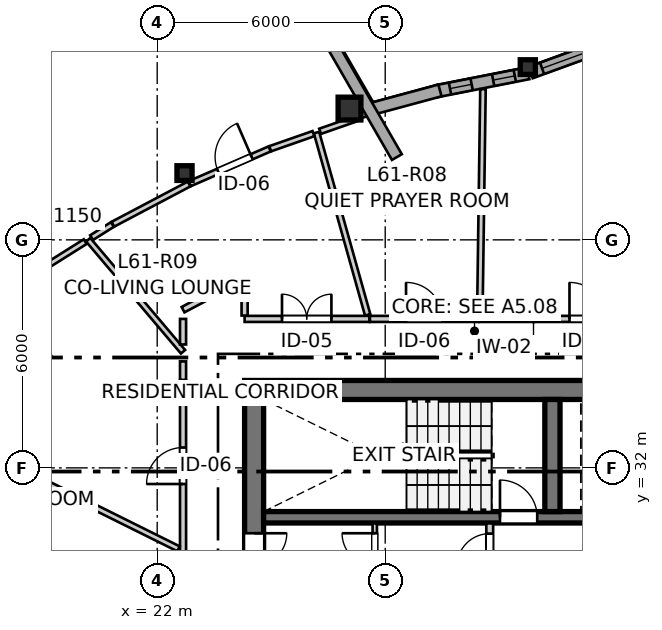
"""IFC4 building model, lengths in metres.
Left out: names, types, materials, properties, quantities, classifications, styles, units other than length and angle.
Written with IfcOpenShell. Run it as: python <this file> out.ifc"""

import sys

from ifc_helpers import new_model, si_unit, direction, frame, frame_2d, origin, origin_2d, place, context, subcontext, project, spatial, rectangle, i_section, extrude, source, transform, mapped, element, fill, save


model = new_model("IFC4")
c1 = context("Model", 3, precision=1e-05, world=origin(), true_north=direction((0.0, 1.0)))
c2 = subcontext(c1, "Body", "Model", "MODEL_VIEW")
j1 = project(units=[si_unit("LENGTHUNIT", "METRE"), si_unit("PLANEANGLEUNIT", "RADIAN")], contexts=[c1])
p1 = place(None, origin())
s1 = spatial("IfcSite", under=j1, at=p1, CompositionType="ELEMENT")
p2 = place(p1, origin())
s2 = spatial("IfcBuilding", under=s1, at=p2, CompositionType="ELEMENT")
p3 = place(p2, frame((0.0, 0.0, 205.2)))
s3 = spatial("IfcBuildingStorey", under=s2, at=p3, CompositionType="ELEMENT", Elevation=205.2)
p4 = place(p3, frame((36.4, 34.05, 0.0), z_axis=(0.0, 0.0, 1.0), x_axis=(-1.0, 0.0, 0.0)))
e1 = element("IfcWall", 1, at=p4, inside=s3, PredefinedType="SHEAR", context=c2, shape_type="SweptSolid", body=[
    extrude(rectangle(XDim=12.1, YDim=0.5, at=frame_2d((6.05, 0.0))), origin(), (0.0, 0.0, 1.0), 2.935),
])
p5 = place(p3, frame((24.55, 33.8, 0.0), z_axis=(0.0, 0.0, 1.0), x_axis=(0.0, -1.0, 0.0)))
e2 = element("IfcWall", 2, at=p5, inside=s3, PredefinedType="SHEAR", context=c2, shape_type="SweptSolid", body=[
    extrude(rectangle(XDim=15.6, YDim=0.5, at=frame_2d((7.8, 0.0))), origin(), (0.0, 0.0, 1.0), 2.935),
])
p6 = place(p5, frame((7.05, 0.0, 0.0)))
e3 = element("IfcOpeningElement", 3, at=p6, cuts=e2, PredefinedType="OPENING", context=c2, shape_type="SweptSolid", body=[
    extrude(rectangle(XDim=1.5, YDim=2.15, at=frame_2d((0.75, 1.075))), frame((0.0, 0.26, 0.0), z_axis=(0.0, -1.0, 0.0), x_axis=(1.0, 0.0, 0.0)), (0.0, 0.0, 1.0), 0.52),
])
p7 = place(p5, frame((3.52, 0.0, 0.0)))
e4 = element("IfcOpeningElement", 4, at=p7, cuts=e2, PredefinedType="OPENING", context=c2, shape_type="SweptSolid", body=[
    extrude(rectangle(XDim=0.86, YDim=2.05, at=frame_2d((0.43, 1.025))), frame((0.0, 0.26, 0.0), z_axis=(0.0, -1.0, 0.0), x_axis=(1.0, 0.0, 0.0)), (0.0, 0.0, 1.0), 0.52),
])
p8 = place(p5, frame((11.22, 0.0, 0.0)))
e5 = element("IfcOpeningElement", 5, at=p8, cuts=e2, PredefinedType="OPENING", context=c2, shape_type="SweptSolid", body=[
    extrude(rectangle(XDim=0.86, YDim=2.05, at=frame_2d((0.43, 1.025))), frame((0.0, 0.26, 0.0), z_axis=(0.0, -1.0, 0.0), x_axis=(1.0, 0.0, 0.0)), (0.0, 0.0, 1.0), 0.52),
])
p9 = place(p3, frame((24.8, 30.7, 0.0), z_axis=(0.0, 0.0, 1.0), x_axis=(1.0, 0.0, 0.0)))
e6 = element("IfcWall", 6, at=p9, inside=s3, PredefinedType="SHEAR", context=c2, shape_type="SweptSolid", body=[
    extrude(rectangle(XDim=11.1, YDim=0.3, at=frame_2d((5.55, 0.0))), origin(), (0.0, 0.0, 1.0), 2.935),
])
p10 = place(p9, frame((6.22, 0.0, 0.0)))
e7 = element("IfcOpeningElement", 7, at=p10, cuts=e6, PredefinedType="OPENING", context=c2, shape_type="SweptSolid", body=[
    extrude(rectangle(XDim=0.98, YDim=2.15, at=frame_2d((0.49, 1.075))), frame((0.0, 0.16, 0.0), z_axis=(0.0, -1.0, 0.0), x_axis=(1.0, 0.0, 0.0)), (0.0, 0.0, 1.0), 0.32),
])
p11 = place(p9, frame((9.15, 0.0, 0.0)))
e8 = element("IfcOpeningElement", 8, at=p11, cuts=e6, PredefinedType="OPENING", context=c2, shape_type="SweptSolid", body=[
    extrude(rectangle(XDim=1.15, YDim=2.15, at=frame_2d((0.575, 1.075))), frame((0.0, 0.16, 0.0), z_axis=(0.0, -1.0, 0.0), x_axis=(1.0, 0.0, 0.0)), (0.0, 0.0, 1.0), 0.32),
])
p12 = place(p3, frame((32.4, 30.85, 0.0), z_axis=(0.0, 0.0, 1.0), x_axis=(0.0, 1.0, 0.0)))
e9 = element("IfcWall", 9, at=p12, inside=s3, PredefinedType="SHEAR", context=c2, shape_type="SweptSolid", body=[
    extrude(rectangle(XDim=2.95, YDim=0.4, at=frame_2d((1.475, 0.0))), origin(), (0.0, 0.0, 1.0), 2.935),
])
m1 = source(origin(), c2, "Body", "SweptSolid", [
    extrude(i_section(OverallWidth=0.398, OverallDepth=0.387, WebThickness=0.019, FlangeThickness=0.03, FilletRadius=0.015, at=origin_2d()), origin(), (0.0, 0.0, 1.0), 2.935),
])
p13 = place(p3, frame((31.752, 42.545, 0.0), z_axis=(0.0, 0.0, 1.0), x_axis=(1.0, 0.0, 0.0)))
e10 = element("IfcColumn", 10, at=p13, inside=s3, PredefinedType="PILASTER", context=c2, shape_type="MappedRepresentation", body=[
    mapped(m1, transform((0.0, 0.0, 0.0), x_axis=(1.0, 0.0, 0.0), y_axis=(0.0, 1.0, 0.0), z_axis=(0.0, 0.0, 1.0), scale=1.0)),
])
m2 = source(origin(), c2, "Body", "SweptSolid", [
    extrude(rectangle(XDim=0.6, YDim=0.6, at=origin_2d()), origin(), (0.0, 0.0, 1.0), 2.935),
])
p14 = place(p3, frame((27.06, 41.454, 0.0), z_axis=(0.0, 0.0, 1.0), x_axis=(1.0, 0.0, 0.0)))
e11 = element("IfcColumn", 11, at=p14, inside=s3, PredefinedType="COLUMN", context=c2, shape_type="MappedRepresentation", body=[
    mapped(m2, transform((0.0, 0.0, 0.0), x_axis=(1.0, 0.0, 0.0), y_axis=(0.0, 1.0, 0.0), z_axis=(0.0, 0.0, 1.0), scale=1.0)),
])
p15 = place(p3, frame((22.719, 39.757, 0.0), z_axis=(0.0, 0.0, 1.0), x_axis=(1.0, 0.0, 0.0)))
e12 = element("IfcColumn", 12, at=p15, inside=s3, PredefinedType="PILASTER", context=c2, shape_type="MappedRepresentation", body=[
    mapped(m1, transform((0.0, 0.0, 0.0), x_axis=(1.0, 0.0, 0.0), y_axis=(0.0, 1.0, 0.0), z_axis=(0.0, 0.0, 1.0), scale=1.0)),
])
p16 = place(p3, frame((33.736, 43.097, 0.0), z_axis=(0.0, 0.0, 1.0), x_axis=(-0.939691662178, -0.342022777067, 0.0)))
e13 = element("IfcWall", 13, at=p16, inside=s3, PredefinedType="SOLIDWALL", context=c2, shape_type="SweptSolid", body=[
    extrude(rectangle(XDim=2.032, YDim=0.32, at=frame_2d((1.016, 0.0))), origin(), (0.0, 0.0, 1.0), 2.555),
])
p17 = place(p16, frame((0.261, 0.0, 0.82)))
e14 = element("IfcOpeningElement", 14, at=p17, cuts=e13, PredefinedType="OPENING", context=c2, shape_type="SweptSolid", body=[
    extrude(rectangle(XDim=1.45, YDim=1.25, at=frame_2d((0.725, 0.625))), frame((0.0, 0.17, 0.0), z_axis=(0.0, -1.0, 0.0), x_axis=(1.0, 0.0, 0.0)), (0.0, 0.0, 1.0), 0.34),
])
p18 = place(p3, frame((31.764, 42.385, 0.0), z_axis=(0.0, 0.0, 1.0), x_axis=(-0.981229659911, -0.192842823335, 0.0)))
e15 = element("IfcWall", 15, at=p18, inside=s3, PredefinedType="SOLIDWALL", context=c2, shape_type="SweptSolid", body=[
    extrude(rectangle(XDim=2.454, YDim=0.32, at=frame_2d((1.227, 0.0))), origin(), (0.0, 0.0, 1.0), 2.555),
])
p19 = place(p18, frame((0.361, 0.0, 0.82)))
e16 = element("IfcOpeningElement", 16, at=p19, cuts=e15, PredefinedType="OPENING", context=c2, shape_type="SweptSolid", body=[
    extrude(rectangle(XDim=0.58, YDim=1.35, at=frame_2d((0.29, 0.675))), frame((0.0, 0.17, 0.0), z_axis=(0.0, -1.0, 0.0), x_axis=(1.0, 0.0, 0.0)), (0.0, 0.0, 1.0), 0.34),
])
p20 = place(p18, frame((1.518, 0.0, 0.82)))
e17 = element("IfcOpeningElement", 17, at=p20, cuts=e15, PredefinedType="OPENING", context=c2, shape_type="SweptSolid", body=[
    extrude(rectangle(XDim=0.58, YDim=1.35, at=frame_2d((0.29, 0.675))), frame((0.0, 0.17, 0.0), z_axis=(0.0, -1.0, 0.0), x_axis=(1.0, 0.0, 0.0)), (0.0, 0.0, 1.0), 0.34),
])
p21 = place(p3, frame((29.441, 41.931, 0.0), z_axis=(0.0, 0.0, 1.0), x_axis=(-0.965448832587, -0.260592693023, 0.0)))
e18 = element("IfcWall", 18, at=p21, inside=s3, PredefinedType="SOLIDWALL", context=c2, shape_type="SweptSolid", body=[
    extrude(rectangle(XDim=2.333, YDim=0.32, at=frame_2d((1.167, 0.0))), origin(), (0.0, 0.0, 1.0), 2.555),
])
p22 = place(p3, frame((28.307, 40.178, 0.0), z_axis=(0.0, 0.0, 1.0), x_axis=(-0.500003467681, 0.866023401709, 0.0)))
e19 = element("IfcWall", 19, at=p22, inside=s3, PredefinedType="SOLIDWALL", context=c2, shape_type="SweptSolid", body=[
    extrude(rectangle(XDim=19.929, YDim=0.3, at=frame_2d((9.964, 0.0))), origin(), (0.0, 0.0, 1.0), 2.115),
])
p23 = place(p3, frame((30.75, 27.43, 0.0), z_axis=(0.0, 0.0, 1.0), x_axis=(0.0, 1.0, 0.0)))
e20 = element("IfcWall", 20, at=p23, inside=s3, PredefinedType="PARTITIONING", context=c2, shape_type="SweptSolid", body=[
    extrude(rectangle(XDim=3.11, YDim=0.18, at=frame_2d((1.555, 0.0))), origin(), (0.0, 0.0, 1.0), 2.935),
])
p24 = place(p23, frame((1.98, 0.0, 0.0)))
e21 = element("IfcOpeningElement", 21, at=p24, cuts=e20, PredefinedType="OPENING", context=c2, shape_type="SweptSolid", body=[
    extrude(rectangle(XDim=0.86, YDim=2.05, at=frame_2d((0.43, 1.025))), frame((0.0, 0.1, 0.0), z_axis=(0.0, -1.0, 0.0), x_axis=(1.0, 0.0, 0.0)), (0.0, 0.0, 1.0), 0.2),
])
p25 = place(p3, frame((27.725, 29.16, 0.0), z_axis=(0.0, 0.0, 1.0), x_axis=(0.0, 1.0, 0.0)))
e22 = element("IfcWall", 22, at=p25, inside=s3, PredefinedType="PARTITIONING", context=c2, shape_type="SweptSolid", body=[
    extrude(rectangle(XDim=1.38, YDim=0.115, at=frame_2d((0.69, 0.0))), origin(), (0.0, 0.0, 1.0), 2.935),
])
p26 = place(p25, frame((0.26, 0.0, 0.0)))
e23 = element("IfcOpeningElement", 23, at=p26, cuts=e22, PredefinedType="OPENING", context=c2, shape_type="SweptSolid", body=[
    extrude(rectangle(XDim=0.86, YDim=2.05, at=frame_2d((0.43, 1.025))), frame((0.0, 0.067, 0.0), z_axis=(0.0, -1.0, 0.0), x_axis=(1.0, 0.0, 0.0)), (0.0, 0.0, 1.0), 0.135),
])
p27 = place(p3, frame((30.474, 35.92, 0.0), z_axis=(0.0, 0.0, 1.0), x_axis=(1.0, 0.0, 0.0)))
e24 = element("IfcWall", 24, at=p27, inside=s3, PredefinedType="PARTITIONING", context=c2, shape_type="SweptSolid", body=[
    extrude(rectangle(XDim=5.713, YDim=0.16, at=frame_2d((2.856, 0.0))), origin(), (0.0, 0.0, 1.0), 2.935),
])
p28 = place(p27, frame((2.375, 0.0, 0.0)))
e25 = element("IfcOpeningElement", 25, at=p28, cuts=e24, PredefinedType="OPENING", context=c2, shape_type="SweptSolid", body=[
    extrude(rectangle(XDim=0.96, YDim=2.1, at=frame_2d((0.48, 1.05))), frame((0.0, 0.09, 0.0), z_axis=(0.0, -1.0, 0.0), x_axis=(1.0, 0.0, 0.0)), (0.0, 0.0, 1.0), 0.18),
])
p29 = place(p3, frame((22.68, 29.794, 0.0), z_axis=(0.0, 0.0, 1.0), x_axis=(0.0, 1.0, 0.0)))
e26 = element("IfcWall", 26, at=p29, inside=s3, PredefinedType="PARTITIONING", context=c2, shape_type="SweptSolid", body=[
    extrude(rectangle(XDim=4.506, YDim=0.16, at=frame_2d((2.253, 0.0))), origin(), (0.0, 0.0, 1.0), 2.935),
])
p30 = place(p29, frame((1.781, 0.0, 0.0)))
e27 = element("IfcOpeningElement", 27, at=p30, cuts=e26, PredefinedType="OPENING", context=c2, shape_type="SweptSolid", body=[
    extrude(rectangle(XDim=0.96, YDim=2.1, at=frame_2d((0.48, 1.05))), frame((0.0, 0.09, 0.0), z_axis=(0.0, -1.0, 0.0), x_axis=(1.0, 0.0, 0.0)), (0.0, 0.0, 1.0), 0.18),
])
p31 = place(p3, frame((24.3, 35.92, 0.0), z_axis=(0.0, 0.0, 1.0), x_axis=(1.0, 0.0, 0.0)))
e28 = element("IfcWall", 28, at=p31, inside=s3, PredefinedType="PARTITIONING", context=c2, shape_type="SweptSolid", body=[
    extrude(rectangle(XDim=3.283, YDim=0.16, at=frame_2d((1.642, 0.0))), origin(), (0.0, 0.0, 1.0), 2.935),
])
p32 = place(p31, frame((0.984, 0.0, 0.0)))
e29 = element("IfcOpeningElement", 29, at=p32, cuts=e28, PredefinedType="OPENING", context=c2, shape_type="SweptSolid", body=[
    extrude(rectangle(XDim=1.3, YDim=2.1, at=frame_2d((0.65, 1.05))), frame((0.0, 0.09, 0.0), z_axis=(0.0, -1.0, 0.0), x_axis=(1.0, 0.0, 0.0)), (0.0, 0.0, 1.0), 0.18),
])
p33 = place(p3, frame((27.598, 35.92, 0.0), z_axis=(0.0, 0.0, 1.0), x_axis=(1.0, 0.0, 0.0)))
e30 = element("IfcWall", 30, at=p33, inside=s3, PredefinedType="PARTITIONING", context=c2, shape_type="SweptSolid", body=[
    extrude(rectangle(XDim=2.861, YDim=0.16, at=frame_2d((1.431, 0.0))), origin(), (0.0, 0.0, 1.0), 2.935),
])
p34 = place(p33, frame((0.95, 0.0, 0.0)))
e31 = element("IfcOpeningElement", 31, at=p34, cuts=e30, PredefinedType="OPENING", context=c2, shape_type="SweptSolid", body=[
    extrude(rectangle(XDim=0.96, YDim=2.1, at=frame_2d((0.48, 1.05))), frame((0.0, 0.09, 0.0), z_axis=(0.0, -1.0, 0.0), x_axis=(1.0, 0.0, 0.0)), (0.0, 0.0, 1.0), 0.18),
])
p35 = place(p3, frame((22.853, 39.477, 0.0), z_axis=(0.0, 0.0, 1.0), x_axis=(0.917164692317, 0.398508377788, 0.0)))
e32 = element("IfcWall", 32, at=p35, inside=s3, PredefinedType="PARTITIONING", context=c2, shape_type="SweptSolid", body=[
    extrude(rectangle(XDim=2.296, YDim=0.145, at=frame_2d((1.148, 0.0))), origin(), (0.0, 0.0, 1.0), 2.543),
])
p36 = place(p35, frame((0.817, 0.0, 0.0)))
e33 = element("IfcOpeningElement", 33, at=p36, cuts=e32, PredefinedType="OPENING", context=c2, shape_type="SweptSolid", body=[
    extrude(rectangle(XDim=0.96, YDim=2.1, at=frame_2d((0.48, 1.05))), frame((0.0, 0.083, 0.0), z_axis=(0.0, -1.0, 0.0), x_axis=(1.0, 0.0, 0.0)), (0.0, 0.0, 1.0), 0.165),
])
p37 = place(p3, frame((14.759, 33.747, 0.0), z_axis=(0.0, 0.0, 1.0), x_axis=(0.895550902793, -0.44495907734, 0.0)))
e34 = element("IfcWall", 34, at=p37, inside=s3, PredefinedType="PARTITIONING", context=c2, shape_type="SweptSolid", body=[
    extrude(rectangle(XDim=8.712, YDim=0.145, at=frame_2d((4.356, 0.0))), origin(), (0.0, 0.0, 1.0), 2.935),
])
p38 = place(p3, frame((30.489, 36.009, 0.0), z_axis=(0.0, 0.0, 1.0), x_axis=(0.013978627514, 0.999902294213, 0.0)))
e35 = element("IfcWall", 35, at=p38, inside=s3, PredefinedType="PARTITIONING", context=c2, shape_type="SweptSolid", body=[
    extrude(rectangle(XDim=5.956, YDim=0.145, at=frame_2d((2.978, 0.0))), origin(), (0.0, 0.0, 1.0), 2.935),
])
p39 = place(p3, frame((26.192, 40.823, 0.0), z_axis=(0.0, 0.0, 1.0), x_axis=(0.270218926069, -0.962798905273, 0.0)))
e36 = element("IfcWall", 36, at=p39, inside=s3, PredefinedType="PARTITIONING", context=c2, shape_type="SweptSolid", body=[
    extrude(rectangle(XDim=4.981, YDim=0.145, at=frame_2d((2.49, 0.0))), origin(), (0.0, 0.0, 1.0), 2.935),
])
p40 = place(p3, frame((20.184, 38.002, 0.0), z_axis=(0.0, 0.0, 1.0), x_axis=(0.646276580378, -0.763103257531, 0.0)))
e37 = element("IfcWall", 37, at=p40, inside=s3, PredefinedType="PARTITIONING", context=c2, shape_type="SweptSolid", body=[
    extrude(rectangle(XDim=3.862, YDim=0.145, at=frame_2d((1.931, 0.0))), origin(), (0.0, 0.0, 1.0), 2.935),
])
p41 = place(p3, frame((20.834, 38.411, 0.0), z_axis=(0.0, 0.0, 1.0), x_axis=(0.884282286127, 0.466952715425, 0.0)))
e38 = element("IfcWall", 38, at=p41, inside=s3, PredefinedType="PARTITIONING", context=c2, shape_type="SweptSolid", body=[
    extrude(rectangle(XDim=2.268, YDim=0.145, at=frame_2d((1.134, 0.0))), origin(), (0.0, 0.0, 1.0), 2.543),
])
p42 = place(p3, frame((22.68, 36.163, 0.0), z_axis=(0.0, 0.0, 1.0), x_axis=(0.884428711586, 0.466675319812, 0.0)))
e39 = element("IfcWall", 39, at=p42, inside=s3, PredefinedType="PARTITIONING", context=c2, shape_type="SweptSolid", body=[
    extrude(rectangle(XDim=1.592, YDim=0.16, at=frame_2d((0.796, 0.0))), origin(), (0.0, 0.0, 1.0), 2.935),
])
p43 = place(p3, frame((18.902, 37.196, 0.0), z_axis=(0.0, 0.0, 1.0), x_axis=(0.846539334405, 0.532326173794, 0.0)))
e40 = element("IfcWall", 40, at=p43, inside=s3, PredefinedType="PARTITIONING", context=c2, shape_type="SweptSolid", body=[
    extrude(rectangle(XDim=1.423, YDim=0.145, at=frame_2d((0.711, 0.0))), origin(), (0.0, 0.0, 1.0), 2.543),
])
p44 = place(p3, frame((24.973, 40.397, 0.0), z_axis=(0.0, 0.0, 1.0), x_axis=(0.943987684609, 0.329980683232, 0.0)))
e41 = element("IfcWall", 41, at=p44, inside=s3, PredefinedType="PARTITIONING", context=c2, shape_type="SweptSolid", body=[
    extrude(rectangle(XDim=1.206, YDim=0.145, at=frame_2d((0.603, 0.0))), origin(), (0.0, 0.0, 1.0), 2.543),
])
p45 = place(p3, frame((24.3, 36.008, 0.0), z_axis=(0.0, 0.0, 1.0), x_axis=(0.0, 1.0, 0.0)))
e42 = element("IfcWall", 42, at=p45, inside=s3, PredefinedType="PARTITIONING", context=c2, shape_type="SweptSolid", body=[
    extrude(rectangle(XDim=0.99, YDim=0.16, at=frame_2d((0.495, 0.0))), origin(), (0.0, 0.0, 1.0), 2.935),
])
p46 = place(p3, frame((26.287, 40.856, 0.0), z_axis=(0.0, 0.0, 1.0), x_axis=(0.944089421658, 0.329689496214, 0.0)))
e43 = element("IfcWall", 43, at=p46, inside=s3, PredefinedType="PARTITIONING", context=c2, shape_type="SweptSolid", body=[
    extrude(rectangle(XDim=1.037, YDim=0.145, at=frame_2d((0.518, 0.0))), origin(), (0.0, 0.0, 1.0), 2.543),
])
p47 = place(p3, frame((22.68, 35.247, 0.0), z_axis=(0.0, 0.0, 1.0), x_axis=(0.0, 1.0, 0.0)))
e44 = element("IfcWall", 44, at=p47, inside=s3, PredefinedType="PARTITIONING", context=c2, shape_type="SweptSolid", body=[
    extrude(rectangle(XDim=0.673, YDim=0.16, at=frame_2d((0.337, 0.0))), origin(), (0.0, 0.0, 1.0), 2.935),
])
p48 = place(p3, frame((20.274, 38.059, 0.0), z_axis=(0.0, 0.0, 1.0), x_axis=(0.84623284009, 0.532813269686, 0.0)))
e45 = element("IfcWall", 45, at=p48, inside=s3, PredefinedType="PARTITIONING", context=c2, shape_type="SweptSolid", body=[
    extrude(rectangle(XDim=0.646, YDim=0.145, at=frame_2d((0.323, 0.0))), origin(), (0.0, 0.0, 1.0), 2.543),
])
p49 = place(p3, frame((22.68, 34.315, 0.0), z_axis=(0.0, 0.0, 1.0), x_axis=(0.0, 1.0, 0.0)))
e46 = element("IfcWall", 46, at=p49, inside=s3, PredefinedType="PARTITIONING", context=c2, shape_type="SweptSolid", body=[
    extrude(rectangle(XDim=0.488, YDim=0.16, at=frame_2d((0.244, 0.0))), origin(), (0.0, 0.0, 1.0), 2.935),
])
m3 = source(origin(), c2, "Body", "SweptSolid", [
    extrude(rectangle(XDim=1.45, YDim=1.25, at=frame_2d((0.725, 0.625))), frame((0.0, 0.03, 0.0), z_axis=(0.0, -1.0, 0.0), x_axis=(1.0, 0.0, 0.0)), (0.0, 0.0, 1.0), 0.06),
])
p50 = place(p17, origin())
e47 = element("IfcWindow", 47, at=p50, inside=s3, PartitioningType="SINGLE_PANEL", PredefinedType="WINDOW", context=c2, shape_type="MappedRepresentation", body=[
    mapped(m3, transform((0.0, 0.0, 0.0), x_axis=(1.0, 0.0, 0.0), y_axis=(0.0, 1.0, 0.0), z_axis=(0.0, 0.0, 1.0), scale=1.0)),
])
fill(e14, e47)
m4 = source(origin(), c2, "Body", "SweptSolid", [
    extrude(rectangle(XDim=0.58, YDim=1.35, at=frame_2d((0.29, 0.675))), frame((0.0, 0.03, 0.0), z_axis=(0.0, -1.0, 0.0), x_axis=(1.0, 0.0, 0.0)), (0.0, 0.0, 1.0), 0.06),
])
p51 = place(p19, origin())
e48 = element("IfcWindow", 48, at=p51, inside=s3, PartitioningType="SINGLE_PANEL", PredefinedType="WINDOW", context=c2, shape_type="MappedRepresentation", body=[
    mapped(m4, transform((0.0, 0.0, 0.0), x_axis=(1.0, 0.0, 0.0), y_axis=(0.0, 1.0, 0.0), z_axis=(0.0, 0.0, 1.0), scale=1.0)),
])
fill(e16, e48)
p52 = place(p20, origin())
e49 = element("IfcWindow", 49, at=p52, inside=s3, PartitioningType="SINGLE_PANEL", PredefinedType="WINDOW", context=c2, shape_type="MappedRepresentation", body=[
    mapped(m4, transform((0.0, 0.0, 0.0), x_axis=(1.0, 0.0, 0.0), y_axis=(0.0, 1.0, 0.0), z_axis=(0.0, 0.0, 1.0), scale=1.0)),
])
fill(e17, e49)
m5 = source(origin(), c2, "Body", "SweptSolid", [
    extrude(rectangle(XDim=0.98, YDim=2.15, at=frame_2d((0.49, 1.075))), frame((0.0, 0.025, 0.0), z_axis=(0.0, -1.0, 0.0), x_axis=(1.0, 0.0, 0.0)), (0.0, 0.0, 1.0), 0.05),
])
p53 = place(p10, origin())
e50 = element("IfcDoor", 50, at=p53, inside=s3, OperationType="SINGLE_SWING_LEFT", PredefinedType="DOOR", context=c2, shape_type="MappedRepresentation", body=[
    mapped(m5, transform((0.0, 0.0, 0.0), x_axis=(1.0, 0.0, 0.0), y_axis=(0.0, 1.0, 0.0), z_axis=(0.0, 0.0, 1.0), scale=1.0)),
])
fill(e7, e50)
m6 = source(origin(), c2, "Body", "SweptSolid", [
    extrude(rectangle(XDim=0.86, YDim=2.05, at=frame_2d((0.43, 1.025))), frame((0.0, 0.025, 0.0), z_axis=(0.0, -1.0, 0.0), x_axis=(1.0, 0.0, 0.0)), (0.0, 0.0, 1.0), 0.05),
])
p54 = place(p7, origin())
e51 = element("IfcDoor", 51, at=p54, inside=s3, OperationType="SINGLE_SWING_LEFT", PredefinedType="DOOR", context=c2, shape_type="MappedRepresentation", body=[
    mapped(m6, transform((0.0, 0.0, 0.0), x_axis=(1.0, 0.0, 0.0), y_axis=(0.0, 1.0, 0.0), z_axis=(0.0, 0.0, 1.0), scale=1.0)),
])
fill(e4, e51)
p55 = place(p24, origin())
e52 = element("IfcDoor", 52, at=p55, inside=s3, OperationType="SINGLE_SWING_LEFT", PredefinedType="DOOR", context=c2, shape_type="MappedRepresentation", body=[
    mapped(m6, transform((0.0, 0.0, 0.0), x_axis=(1.0, 0.0, 0.0), y_axis=(0.0, 1.0, 0.0), z_axis=(0.0, 0.0, 1.0), scale=1.0)),
])
fill(e21, e52)
p56 = place(p26, origin())
e53 = element("IfcDoor", 53, at=p56, inside=s3, OperationType="SINGLE_SWING_RIGHT", PredefinedType="DOOR", context=c2, shape_type="MappedRepresentation", body=[
    mapped(m6, transform((0.0, 0.0, 0.0), x_axis=(1.0, 0.0, 0.0), y_axis=(0.0, 1.0, 0.0), z_axis=(0.0, 0.0, 1.0), scale=1.0)),
])
fill(e23, e53)
m7 = source(origin(), c2, "Body", "SweptSolid", [
    extrude(rectangle(XDim=0.96, YDim=2.1, at=frame_2d((0.48, 1.05))), frame((0.0, 0.025, 0.0), z_axis=(0.0, -1.0, 0.0), x_axis=(1.0, 0.0, 0.0)), (0.0, 0.0, 1.0), 0.05),
])
p57 = place(p28, origin())
e54 = element("IfcDoor", 54, at=p57, inside=s3, OperationType="SINGLE_SWING_LEFT", PredefinedType="DOOR", context=c2, shape_type="MappedRepresentation", body=[
    mapped(m7, transform((0.0, 0.0, 0.0), x_axis=(1.0, 0.0, 0.0), y_axis=(0.0, 1.0, 0.0), z_axis=(0.0, 0.0, 1.0), scale=1.0)),
])
fill(e25, e54)
p58 = place(p30, origin())
e55 = element("IfcDoor", 55, at=p58, inside=s3, OperationType="SINGLE_SWING_LEFT", PredefinedType="DOOR", context=c2, shape_type="MappedRepresentation", body=[
    mapped(m7, transform((0.0, 0.0, 0.0), x_axis=(1.0, 0.0, 0.0), y_axis=(0.0, 1.0, 0.0), z_axis=(0.0, 0.0, 1.0), scale=1.0)),
])
fill(e27, e55)
m8 = source(origin(), c2, "Body", "SweptSolid", [
    extrude(rectangle(XDim=1.3, YDim=2.1, at=frame_2d((0.65, 1.05))), frame((0.0, 0.025, 0.0), z_axis=(0.0, -1.0, 0.0), x_axis=(1.0, 0.0, 0.0)), (0.0, 0.0, 1.0), 0.05),
])
p59 = place(p32, origin())
e56 = element("IfcDoor", 56, at=p59, inside=s3, OperationType="DOUBLE_DOOR_SINGLE_SWING", PredefinedType="DOOR", context=c2, shape_type="MappedRepresentation", body=[
    mapped(m8, transform((0.0, 0.0, 0.0), x_axis=(1.0, 0.0, 0.0), y_axis=(0.0, 1.0, 0.0), z_axis=(0.0, 0.0, 1.0), scale=1.0)),
])
fill(e29, e56)
p60 = place(p34, origin())
e57 = element("IfcDoor", 57, at=p60, inside=s3, OperationType="SINGLE_SWING_LEFT", PredefinedType="DOOR", context=c2, shape_type="MappedRepresentation", body=[
    mapped(m7, transform((0.0, 0.0, 0.0), x_axis=(1.0, 0.0, 0.0), y_axis=(0.0, 1.0, 0.0), z_axis=(0.0, 0.0, 1.0), scale=1.0)),
])
fill(e31, e57)
p61 = place(p36, origin())
e58 = element("IfcDoor", 58, at=p61, inside=s3, OperationType="SINGLE_SWING_RIGHT", PredefinedType="DOOR", context=c2, shape_type="MappedRepresentation", body=[
    mapped(m7, transform((0.0, 0.0, 0.0), x_axis=(1.0, 0.0, 0.0), y_axis=(0.0, 1.0, 0.0), z_axis=(0.0, 0.0, 1.0), scale=1.0)),
])
fill(e33, e58)
save(model, sys.argv[1])
